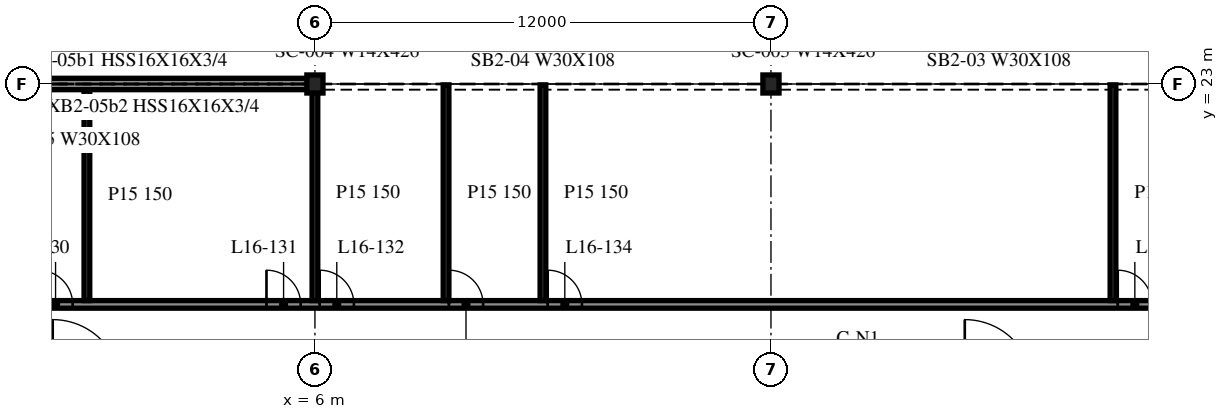
"""IFC4 building model, lengths in metres.
Left out: names, types, materials, properties, quantities, classifications, styles, units other than length and angle.
Written with IfcOpenShell. Run it as: python <this file> out.ifc"""

import sys

from ifc_helpers import new_model, si_unit, direction, frame, frame_2d, origin, origin_2d, place, context, subcontext, project, spatial, rectangle, i_section, extrude, element, fill, save


model = new_model("IFC4")
c1 = context("Model", 3, precision=1e-05, world=origin(), true_north=direction((0.0, 1.0)))
c2 = subcontext(c1, "Body", "Model", "MODEL_VIEW")
j1 = project(units=[si_unit("LENGTHUNIT", "METRE"), si_unit("PLANEANGLEUNIT", "RADIAN")], contexts=[c1])
p1 = place(None, origin())
s1 = spatial("IfcSite", under=j1, at=p1, CompositionType="ELEMENT")
p2 = place(p1, origin())
s2 = spatial("IfcBuilding", under=s1, at=p2, CompositionType="ELEMENT")
p3 = place(p2, frame((0.0, 0.0, 71.8)))
s3 = spatial("IfcBuildingStorey", under=s2, at=p3, CompositionType="ELEMENT", Elevation=71.8)
for number, where, z_axis, x_axis in (
    (1, (18.0, 23.0, -0.34), (0.0, 0.0, 1.0), (1.0, 0.0, 0.0)),
    (2, (6.0, 23.0, -0.34), (0.0, 0.0, 1.0), (1.0, 0.0, 0.0)),
):
    element("IfcColumn", number, at=place(p3, frame(where, z_axis=z_axis, x_axis=x_axis)), inside=s3, PredefinedType="COLUMN", context=c2, shape_type="SweptSolid", body=[
        extrude(i_section(OverallWidth=0.424, OverallDepth=0.475, WebThickness=0.048, FlangeThickness=0.077, at=origin_2d()), origin(), (0.0, 0.0, 1.0), 4.3),
    ])
p4 = place(p3, frame((5.976, 23.0, 0.0), z_axis=(0.0, 0.0, 1.0), x_axis=(-1.0, 0.0, 0.0)))
e3 = element("IfcWall", 3, at=p4, inside=s3, PredefinedType="NOTDEFINED", context=c2, shape_type="SweptSolid", body=[
    extrude(rectangle(XDim=11.952, YDim=0.3, at=frame_2d((5.976, 0.0))), origin(), (0.0, 0.0, 1.0), 3.203),
])
p5 = place(p3, frame((-41.975, 17.2, 0.0), z_axis=(0.0, 0.0, 1.0), x_axis=(1.0, 0.0, 0.0)))
e4 = element("IfcWall", 4, at=p5, inside=s3, PredefinedType="PARTITIONING", context=c2, shape_type="SweptSolid", body=[
    extrude(rectangle(XDim=95.782, YDim=0.2, at=frame_2d((47.891, 0.0))), origin(), (0.0, 0.0, 1.0), 3.96),
])
p6 = place(p5, frame((13.7, 0.0, 0.0)))
e5 = element("IfcOpeningElement", 5, at=p6, cuts=e4, PredefinedType="OPENING", context=c2, shape_type="SweptSolid", body=[
    extrude(rectangle(XDim=0.9, YDim=2.1, at=frame_2d((0.45, 1.05))), frame((0.0, 0.11, 0.0), z_axis=(0.0, -1.0, 0.0), x_axis=(1.0, 0.0, 0.0)), (0.0, 0.0, 1.0), 0.22),
])
p7 = place(p5, frame((19.7, 0.0, 0.0)))
e6 = element("IfcOpeningElement", 6, at=p7, cuts=e4, PredefinedType="OPENING", context=c2, shape_type="SweptSolid", body=[
    extrude(rectangle(XDim=0.9, YDim=2.1, at=frame_2d((0.45, 1.05))), frame((0.0, 0.11, 0.0), z_axis=(0.0, -1.0, 0.0), x_axis=(1.0, 0.0, 0.0)), (0.0, 0.0, 1.0), 0.22),
])
p8 = place(p5, frame((23.1, 0.0, 0.0)))
e7 = element("IfcOpeningElement", 7, at=p8, cuts=e4, PredefinedType="OPENING", context=c2, shape_type="SweptSolid", body=[
    extrude(rectangle(XDim=0.9, YDim=2.1, at=frame_2d((0.45, 1.05))), frame((0.0, 0.11, 0.0), z_axis=(0.0, -1.0, 0.0), x_axis=(1.0, 0.0, 0.0)), (0.0, 0.0, 1.0), 0.22),
])
p9 = place(p5, frame((25.7, 0.0, 0.0)))
e8 = element("IfcOpeningElement", 8, at=p9, cuts=e4, PredefinedType="OPENING", context=c2, shape_type="SweptSolid", body=[
    extrude(rectangle(XDim=0.9, YDim=2.1, at=frame_2d((0.45, 1.05))), frame((0.0, 0.11, 0.0), z_axis=(0.0, -1.0, 0.0), x_axis=(1.0, 0.0, 0.0)), (0.0, 0.0, 1.0), 0.22),
])
p10 = place(p5, frame((40.7, 0.0, 0.0)))
e9 = element("IfcOpeningElement", 9, at=p10, cuts=e4, PredefinedType="OPENING", context=c2, shape_type="SweptSolid", body=[
    extrude(rectangle(XDim=0.9, YDim=2.1, at=frame_2d((0.45, 1.05))), frame((0.0, 0.11, 0.0), z_axis=(0.0, -1.0, 0.0), x_axis=(1.0, 0.0, 0.0)), (0.0, 0.0, 1.0), 0.22),
])
p11 = place(p5, frame((46.7, 0.0, 0.0)))
e10 = element("IfcOpeningElement", 10, at=p11, cuts=e4, PredefinedType="OPENING", context=c2, shape_type="SweptSolid", body=[
    extrude(rectangle(XDim=0.9, YDim=2.1, at=frame_2d((0.45, 1.05))), frame((0.0, 0.11, 0.0), z_axis=(0.0, -1.0, 0.0), x_axis=(1.0, 0.0, 0.0)), (0.0, 0.0, 1.0), 0.22),
])
p12 = place(p5, frame((48.1, 0.0, 0.0)))
e11 = element("IfcOpeningElement", 11, at=p12, cuts=e4, PredefinedType="OPENING", context=c2, shape_type="SweptSolid", body=[
    extrude(rectangle(XDim=0.9, YDim=2.1, at=frame_2d((0.45, 1.05))), frame((0.0, 0.11, 0.0), z_axis=(0.0, -1.0, 0.0), x_axis=(1.0, 0.0, 0.0)), (0.0, 0.0, 1.0), 0.22),
])
p13 = place(p5, frame((51.5, 0.0, 0.0)))
e12 = element("IfcOpeningElement", 12, at=p13, cuts=e4, PredefinedType="OPENING", context=c2, shape_type="SweptSolid", body=[
    extrude(rectangle(XDim=0.9, YDim=2.1, at=frame_2d((0.45, 1.05))), frame((0.0, 0.11, 0.0), z_axis=(0.0, -1.0, 0.0), x_axis=(1.0, 0.0, 0.0)), (0.0, 0.0, 1.0), 0.22),
])
p14 = place(p5, frame((54.1, 0.0, 0.0)))
e13 = element("IfcOpeningElement", 13, at=p14, cuts=e4, PredefinedType="OPENING", context=c2, shape_type="SweptSolid", body=[
    extrude(rectangle(XDim=0.9, YDim=2.1, at=frame_2d((0.45, 1.05))), frame((0.0, 0.11, 0.0), z_axis=(0.0, -1.0, 0.0), x_axis=(1.0, 0.0, 0.0)), (0.0, 0.0, 1.0), 0.22),
])
p15 = place(p5, frame((69.1, 0.0, 0.0)))
e14 = element("IfcOpeningElement", 14, at=p15, cuts=e4, PredefinedType="OPENING", context=c2, shape_type="SweptSolid", body=[
    extrude(rectangle(XDim=0.9, YDim=2.1, at=frame_2d((0.45, 1.05))), frame((0.0, 0.11, 0.0), z_axis=(0.0, -1.0, 0.0), x_axis=(1.0, 0.0, 0.0)), (0.0, 0.0, 1.0), 0.22),
])
p16 = place(p5, frame((75.1, 0.0, 0.0)))
e15 = element("IfcOpeningElement", 15, at=p16, cuts=e4, PredefinedType="OPENING", context=c2, shape_type="SweptSolid", body=[
    extrude(rectangle(XDim=0.9, YDim=2.1, at=frame_2d((0.45, 1.05))), frame((0.0, 0.11, 0.0), z_axis=(0.0, -1.0, 0.0), x_axis=(1.0, 0.0, 0.0)), (0.0, 0.0, 1.0), 0.22),
])
p17 = place(p5, frame((78.1, 0.0, 0.0)))
e16 = element("IfcOpeningElement", 16, at=p17, cuts=e4, PredefinedType="OPENING", context=c2, shape_type="SweptSolid", body=[
    extrude(rectangle(XDim=0.9, YDim=2.1, at=frame_2d((0.45, 1.05))), frame((0.0, 0.11, 0.0), z_axis=(0.0, -1.0, 0.0), x_axis=(1.0, 0.0, 0.0)), (0.0, 0.0, 1.0), 0.22),
])
p18 = place(p5, frame((81.5, 0.0, 0.0)))
e17 = element("IfcOpeningElement", 17, at=p18, cuts=e4, PredefinedType="OPENING", context=c2, shape_type="SweptSolid", body=[
    extrude(rectangle(XDim=0.9, YDim=2.1, at=frame_2d((0.45, 1.05))), frame((0.0, 0.11, 0.0), z_axis=(0.0, -1.0, 0.0), x_axis=(1.0, 0.0, 0.0)), (0.0, 0.0, 1.0), 0.22),
])
p19 = place(p3, frame((0.0, 17.3, 0.0), z_axis=(0.0, 0.0, 1.0), x_axis=(0.0, 1.0, 0.0)))
e18 = element("IfcWall", 18, at=p19, inside=s3, PredefinedType="PARTITIONING", context=c2, shape_type="SweptSolid", body=[
    extrude(rectangle(XDim=5.55, YDim=0.15, at=frame_2d((2.775, 0.0))), origin(), (0.0, 0.0, 1.0), 3.96),
])
for number, where, z_axis, x_axis in (
    (19, (6.0, 17.3, 0.0), (0.0, 0.0, 1.0), (0.0, 1.0, 0.0)),
    (20, (9.45, 17.3, 0.0), (0.0, 0.0, 1.0), (0.0, 1.0, 0.0)),
    (21, (12.0, 17.3, 0.0), (0.0, 0.0, 1.0), (0.0, 1.0, 0.0)),
    (22, (27.0, 17.3, 0.0), (0.0, 0.0, 1.0), (0.0, 1.0, 0.0)),
):
    element("IfcWall", number, at=place(p3, frame(where, z_axis=z_axis, x_axis=x_axis)), inside=s3, PredefinedType="PARTITIONING", context=c2, shape_type="SweptSolid", body=[
        extrude(rectangle(XDim=5.675, YDim=0.15, at=frame_2d((2.837, 0.0))), origin(), (0.0, 0.0, 1.0), 3.96),
    ])
p20 = place(p10, origin())
e23 = element("IfcDoor", 23, at=p20, inside=s3, OperationType="SINGLE_SWING_LEFT", PredefinedType="DOOR", context=c2, shape_type="SweptSolid", body=[
    extrude(rectangle(XDim=0.9, YDim=2.1, at=frame_2d((0.45, 1.05))), frame((0.0, 0.025, 0.0), z_axis=(0.0, -1.0, 0.0), x_axis=(1.0, 0.0, 0.0)), (0.0, 0.0, 1.0), 0.05),
])
fill(e9, e23)
p21 = place(p11, origin())
e24 = element("IfcDoor", 24, at=p21, inside=s3, OperationType="SINGLE_SWING_LEFT", PredefinedType="DOOR", context=c2, shape_type="SweptSolid", body=[
    extrude(rectangle(XDim=0.9, YDim=2.1, at=frame_2d((0.45, 1.05))), frame((0.0, 0.025, 0.0), z_axis=(0.0, -1.0, 0.0), x_axis=(1.0, 0.0, 0.0)), (0.0, 0.0, 1.0), 0.05),
])
fill(e10, e24)
p22 = place(p12, origin())
e25 = element("IfcDoor", 25, at=p22, inside=s3, OperationType="SINGLE_SWING_RIGHT", PredefinedType="DOOR", context=c2, shape_type="SweptSolid", body=[
    extrude(rectangle(XDim=0.9, YDim=2.1, at=frame_2d((0.45, 1.05))), frame((0.0, 0.025, 0.0), z_axis=(0.0, -1.0, 0.0), x_axis=(1.0, 0.0, 0.0)), (0.0, 0.0, 1.0), 0.05),
])
fill(e11, e25)
p23 = place(p13, origin())
e26 = element("IfcDoor", 26, at=p23, inside=s3, OperationType="SINGLE_SWING_RIGHT", PredefinedType="DOOR", context=c2, shape_type="SweptSolid", body=[
    extrude(rectangle(XDim=0.9, YDim=2.1, at=frame_2d((0.45, 1.05))), frame((0.0, 0.025, 0.0), z_axis=(0.0, -1.0, 0.0), x_axis=(1.0, 0.0, 0.0)), (0.0, 0.0, 1.0), 0.05),
])
fill(e12, e26)
p24 = place(p14, origin())
e27 = element("IfcDoor", 27, at=p24, inside=s3, OperationType="SINGLE_SWING_RIGHT", PredefinedType="DOOR", context=c2, shape_type="SweptSolid", body=[
    extrude(rectangle(XDim=0.9, YDim=2.1, at=frame_2d((0.45, 1.05))), frame((0.0, 0.025, 0.0), z_axis=(0.0, -1.0, 0.0), x_axis=(1.0, 0.0, 0.0)), (0.0, 0.0, 1.0), 0.05),
])
fill(e13, e27)
p25 = place(p15, origin())
e28 = element("IfcDoor", 28, at=p25, inside=s3, OperationType="SINGLE_SWING_RIGHT", PredefinedType="DOOR", context=c2, shape_type="SweptSolid", body=[
    extrude(rectangle(XDim=0.9, YDim=2.1, at=frame_2d((0.45, 1.05))), frame((0.0, 0.025, 0.0), z_axis=(0.0, -1.0, 0.0), x_axis=(1.0, 0.0, 0.0)), (0.0, 0.0, 1.0), 0.05),
])
fill(e14, e28)
save(model, sys.argv[1])
